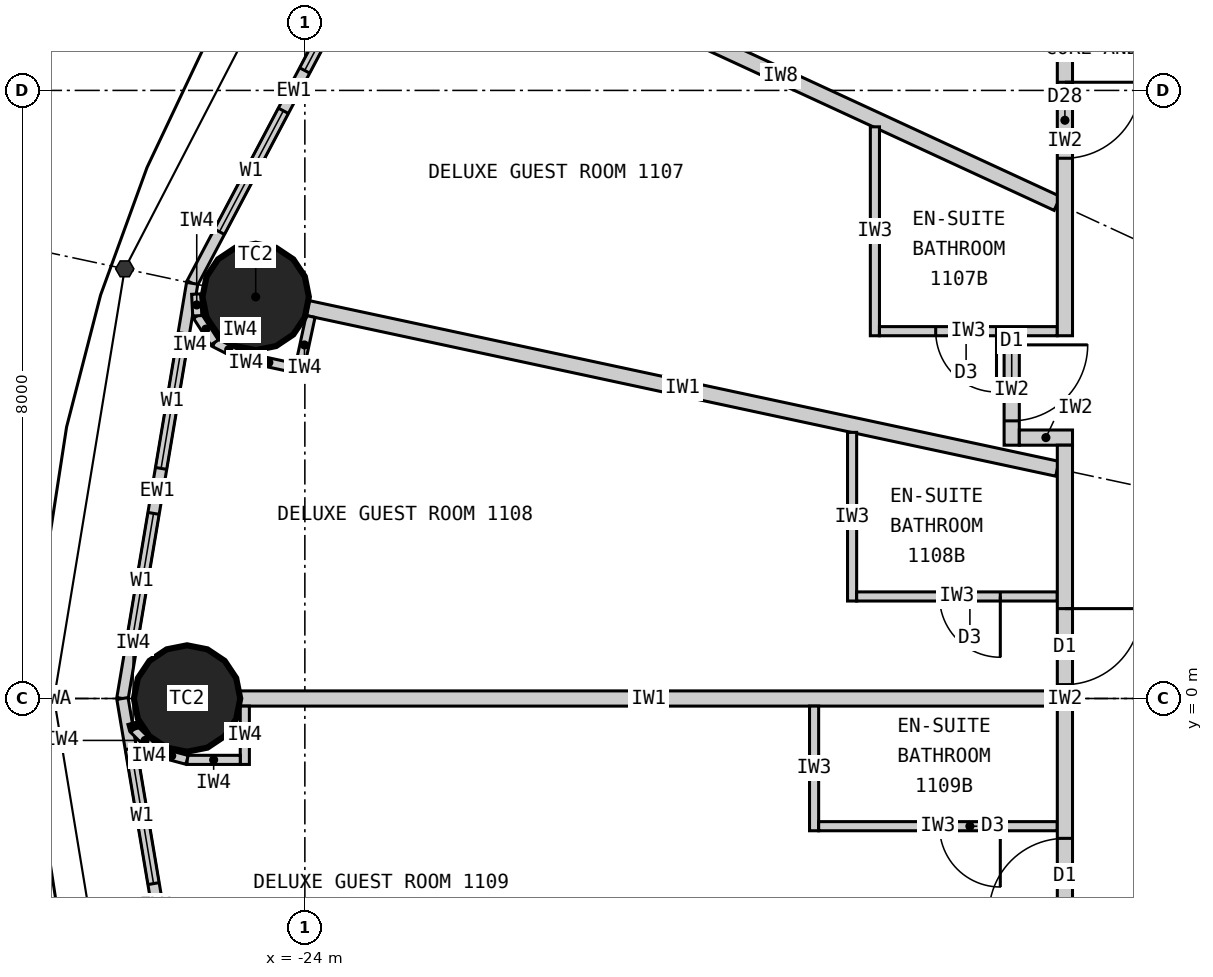
"""IFC4 building model, lengths in metres.
Left out: names, types, materials, properties, quantities, classifications, styles, units other than length and angle.
Written with IfcOpenShell. Run it as: python <this file> out.ifc"""

import sys

from ifc_helpers import new_model, si_unit, direction, frame, frame_2d, origin, origin_2d, place, context, subcontext, project, spatial, rectangle, circle, extrude, element, fill, save


model = new_model("IFC4")
c1 = context("Model", 3, precision=1e-05, world=origin(), true_north=direction((0.0, 1.0)))
c2 = subcontext(c1, "Body", "Model", "MODEL_VIEW")
j1 = project(units=[si_unit("LENGTHUNIT", "METRE"), si_unit("PLANEANGLEUNIT", "RADIAN")], contexts=[c1])
p1 = place(None, origin())
s1 = spatial("IfcSite", under=j1, at=p1, CompositionType="ELEMENT")
p2 = place(p1, origin())
s2 = spatial("IfcBuilding", under=s1, at=p2, CompositionType="ELEMENT")
p3 = place(p2, frame((0.0, 0.0, 50.7)))
s3 = spatial("IfcBuildingStorey", under=s2, at=p3, CompositionType="ELEMENT", Elevation=50.7)
for number, where, z_axis, x_axis in (
    (1, (-24.647, 5.283, 0.0), (0.0, 0.0, 1.0), (1.0, 0.0, 0.0)),
    (2, (-25.55, 0.0, 0.0), (0.0, 0.0, 1.0), (1.0, 0.0, 0.0)),
):
    element("IfcColumn", number, at=place(p3, frame(where, z_axis=z_axis, x_axis=x_axis)), inside=s3, PredefinedType="COLUMN", context=c2, shape_type="SweptSolid", body=[
        extrude(circle(Radius=0.7, at=origin_2d()), origin(), (0.0, 0.0, 1.0), 3.3),
    ])
p4 = place(p3, frame((-22.803, 10.532, 0.0), z_axis=(0.0, 0.0, 1.0), x_axis=(-0.467296867008, -0.884100468321, 0.0)))
e3 = element("IfcWall", 3, at=p4, inside=s3, PredefinedType="ELEMENTEDWALL", context=c2, shape_type="SweptSolid", body=[
    extrude(rectangle(XDim=5.734, YDim=0.15, at=frame_2d((2.867, 0.0))), origin(), (0.0, 0.0, 1.0), 3.12),
])
p5 = place(p4, frame((0.767, 0.0, 0.9)))
e4 = element("IfcOpeningElement", 4, at=p5, cuts=e3, PredefinedType="OPENING", context=c2, shape_type="SweptSolid", body=[
    extrude(rectangle(XDim=1.8, YDim=1.9, at=frame_2d((0.9, 0.95))), frame((0.0, 0.085, 0.0), z_axis=(0.0, -1.0, 0.0), x_axis=(1.0, 0.0, 0.0)), (0.0, 0.0, 1.0), 0.17),
])
p6 = place(p4, frame((3.167, 0.0, 0.9)))
e5 = element("IfcOpeningElement", 5, at=p6, cuts=e3, PredefinedType="OPENING", context=c2, shape_type="SweptSolid", body=[
    extrude(rectangle(XDim=1.8, YDim=1.9, at=frame_2d((0.9, 0.95))), frame((0.0, 0.085, 0.0), z_axis=(0.0, -1.0, 0.0), x_axis=(1.0, 0.0, 0.0)), (0.0, 0.0, 1.0), 0.17),
])
p7 = place(p3, frame((-25.482, 5.462, 0.0), z_axis=(0.0, 0.0, 1.0), x_axis=(-0.165642551694, -0.986185857264, 0.0)))
e6 = element("IfcWall", 6, at=p7, inside=s3, PredefinedType="ELEMENTEDWALL", context=c2, shape_type="SweptSolid", body=[
    extrude(rectangle(XDim=5.539, YDim=0.15, at=frame_2d((2.77, 0.0))), origin(), (0.0, 0.0, 1.0), 3.12),
])
p8 = place(p7, frame((0.669, 0.0, 0.9)))
e7 = element("IfcOpeningElement", 7, at=p8, cuts=e6, PredefinedType="OPENING", context=c2, shape_type="SweptSolid", body=[
    extrude(rectangle(XDim=1.8, YDim=1.9, at=frame_2d((0.9, 0.95))), frame((0.0, 0.085, 0.0), z_axis=(0.0, -1.0, 0.0), x_axis=(1.0, 0.0, 0.0)), (0.0, 0.0, 1.0), 0.17),
])
p9 = place(p7, frame((3.07, 0.0, 0.9)))
e8 = element("IfcOpeningElement", 8, at=p9, cuts=e6, PredefinedType="OPENING", context=c2, shape_type="SweptSolid", body=[
    extrude(rectangle(XDim=1.8, YDim=1.9, at=frame_2d((0.9, 0.95))), frame((0.0, 0.085, 0.0), z_axis=(0.0, -1.0, 0.0), x_axis=(1.0, 0.0, 0.0)), (0.0, 0.0, 1.0), 0.17),
])
p10 = place(p3, frame((-26.4, 0.0, 0.0), z_axis=(0.0, 0.0, 1.0), x_axis=(0.165642551694, -0.986185857264, 0.0)))
e9 = element("IfcWall", 9, at=p10, inside=s3, PredefinedType="ELEMENTEDWALL", context=c2, shape_type="SweptSolid", body=[
    extrude(rectangle(XDim=5.539, YDim=0.15, at=frame_2d((2.77, 0.0))), origin(), (0.0, 0.0, 1.0), 3.12),
])
p11 = place(p10, frame((0.669, 0.0, 0.9)))
e10 = element("IfcOpeningElement", 10, at=p11, cuts=e9, PredefinedType="OPENING", context=c2, shape_type="SweptSolid", body=[
    extrude(rectangle(XDim=1.8, YDim=1.9, at=frame_2d((0.9, 0.95))), frame((0.0, 0.085, 0.0), z_axis=(0.0, -1.0, 0.0), x_axis=(1.0, 0.0, 0.0)), (0.0, 0.0, 1.0), 0.17),
])
p12 = place(p10, frame((3.07, 0.0, 0.9)))
e11 = element("IfcOpeningElement", 11, at=p12, cuts=e9, PredefinedType="OPENING", context=c2, shape_type="SweptSolid", body=[
    extrude(rectangle(XDim=1.8, YDim=1.9, at=frame_2d((0.9, 0.95))), frame((0.0, 0.085, 0.0), z_axis=(0.0, -1.0, 0.0), x_axis=(1.0, 0.0, 0.0)), (0.0, 0.0, 1.0), 0.17),
])
p13 = place(p3, frame((-14.1, 6.512, 0.0), z_axis=(0.0, 0.0, 1.0), x_axis=(-0.907832871056, 0.419332181247, 0.0)))
e12 = element("IfcWall", 12, at=p13, inside=s3, PredefinedType="PARTITIONING", context=c2, shape_type="SweptSolid", body=[
    extrude(rectangle(XDim=8.023, YDim=0.2, at=frame_2d((4.011, 0.0))), origin(), (0.0, 0.0, 1.0), 2.32),
])
p14 = place(p3, frame((-14.1, 3.022, 0.0), z_axis=(0.0, 0.0, 1.0), x_axis=(-0.977790014929, 0.209586943072, 0.0)))
e13 = element("IfcWall", 13, at=p14, inside=s3, PredefinedType="PARTITIONING", context=c2, shape_type="SweptSolid", body=[
    extrude(rectangle(XDim=10.087, YDim=0.2, at=frame_2d((5.043, 0.0))), origin(), (0.0, 0.0, 1.0), 2.32),
])
p15 = place(p3, frame((-14.1, 0.0, 0.0), z_axis=(0.0, 0.0, 1.0), x_axis=(-1.0, 0.0, 0.0)))
e14 = element("IfcWall", 14, at=p15, inside=s3, PredefinedType="PARTITIONING", context=c2, shape_type="SweptSolid", body=[
    extrude(rectangle(XDim=10.75, YDim=0.2, at=frame_2d((5.375, 0.0))), origin(), (0.0, 0.0, 1.0), 2.27),
])
p16 = place(p3, frame((-16.5, 7.521, 0.0), z_axis=(0.0, 0.0, 1.0), x_axis=(0.0, -1.0, 0.0)))
e15 = element("IfcWall", 15, at=p16, inside=s3, PredefinedType="PARTITIONING", context=c2, shape_type="SweptSolid", body=[
    extrude(rectangle(XDim=2.749, YDim=0.12, at=frame_2d((1.374, 0.0))), origin(), (0.0, 0.0, 1.0), 3.12),
])
p17 = place(p3, frame((-14.1, 4.833, 0.0), z_axis=(0.0, 0.0, 1.0), x_axis=(-1.0, 0.0, 0.0)))
e16 = element("IfcWall", 16, at=p17, inside=s3, PredefinedType="PARTITIONING", context=c2, shape_type="SweptSolid", body=[
    extrude(rectangle(XDim=2.34, YDim=0.12, at=frame_2d((1.17, 0.0))), origin(), (0.0, 0.0, 1.0), 3.12),
])
p18 = place(p17, frame((0.8, 0.0, 0.0)))
e17 = element("IfcOpeningElement", 17, at=p18, cuts=e16, PredefinedType="OPENING", context=c2, shape_type="SweptSolid", body=[
    extrude(rectangle(XDim=0.8, YDim=2.1, at=frame_2d((0.4, 1.05))), frame((0.0, 0.07, 0.0), z_axis=(0.0, -1.0, 0.0), x_axis=(1.0, 0.0, 0.0)), (0.0, 0.0, 1.0), 0.14),
])
p19 = place(p3, frame((-16.8, 3.501, 0.0), z_axis=(0.0, 0.0, 1.0), x_axis=(0.0, -1.0, 0.0)))
e18 = element("IfcWall", 18, at=p19, inside=s3, PredefinedType="PARTITIONING", context=c2, shape_type="SweptSolid", body=[
    extrude(rectangle(XDim=2.219, YDim=0.12, at=frame_2d((1.109, 0.0))), origin(), (0.0, 0.0, 1.0), 3.12),
])
p20 = place(p3, frame((-14.1, 1.343, 0.0), z_axis=(0.0, 0.0, 1.0), x_axis=(-1.0, 0.0, 0.0)))
e19 = element("IfcWall", 19, at=p20, inside=s3, PredefinedType="PARTITIONING", context=c2, shape_type="SweptSolid", body=[
    extrude(rectangle(XDim=2.64, YDim=0.12, at=frame_2d((1.32, 0.0))), origin(), (0.0, 0.0, 1.0), 3.12),
])
p21 = place(p20, frame((0.75, 0.0, 0.0)))
e20 = element("IfcOpeningElement", 20, at=p21, cuts=e19, PredefinedType="OPENING", context=c2, shape_type="SweptSolid", body=[
    extrude(rectangle(XDim=0.8, YDim=2.1, at=frame_2d((0.4, 1.05))), frame((0.0, 0.07, 0.0), z_axis=(0.0, -1.0, 0.0), x_axis=(1.0, 0.0, 0.0)), (0.0, 0.0, 1.0), 0.14),
])
p22 = place(p3, frame((-17.3, -0.1, 0.0), z_axis=(0.0, 0.0, 1.0), x_axis=(0.0, -1.0, 0.0)))
e21 = element("IfcWall", 21, at=p22, inside=s3, PredefinedType="PARTITIONING", context=c2, shape_type="SweptSolid", body=[
    extrude(rectangle(XDim=1.64, YDim=0.12, at=frame_2d((0.82, 0.0))), origin(), (0.0, 0.0, 1.0), 3.12),
])
p23 = place(p3, frame((-14.1, -1.68, 0.0), z_axis=(0.0, 0.0, 1.0), x_axis=(-1.0, 0.0, 0.0)))
e22 = element("IfcWall", 22, at=p23, inside=s3, PredefinedType="PARTITIONING", context=c2, shape_type="SweptSolid", body=[
    extrude(rectangle(XDim=3.14, YDim=0.12, at=frame_2d((1.57, 0.0))), origin(), (0.0, 0.0, 1.0), 3.12),
])
p24 = place(p23, frame((0.75, 0.0, 0.0)))
e23 = element("IfcOpeningElement", 23, at=p24, cuts=e22, PredefinedType="OPENING", context=c2, shape_type="SweptSolid", body=[
    extrude(rectangle(XDim=0.8, YDim=2.1, at=frame_2d((0.4, 1.05))), frame((0.0, 0.07, 0.0), z_axis=(0.0, -1.0, 0.0), x_axis=(1.0, 0.0, 0.0)), (0.0, 0.0, 1.0), 0.14),
])
p25 = place(p3, frame((-14.7, 4.772, 0.0), z_axis=(0.0, 0.0, 1.0), x_axis=(0.0, -1.0, 0.0)))
e24 = element("IfcWall", 24, at=p25, inside=s3, PredefinedType="PARTITIONING", context=c2, shape_type="SweptSolid", body=[
    extrude(rectangle(XDim=1.44, YDim=0.2, at=frame_2d((0.72, 0.0))), origin(), (0.0, 0.0, 1.0), 3.12),
])
p26 = place(p25, frame((0.12, 0.0, 0.0)))
e25 = element("IfcOpeningElement", 25, at=p26, cuts=e24, PredefinedType="OPENING", context=c2, shape_type="SweptSolid", body=[
    extrude(rectangle(XDim=1.0, YDim=2.2, at=frame_2d((0.5, 1.1))), frame((0.0, 0.11, 0.0), z_axis=(0.0, -1.0, 0.0), x_axis=(1.0, 0.0, 0.0)), (0.0, 0.0, 1.0), 0.22),
])
p27 = place(p3, frame((-13.9, 3.433, 0.0), z_axis=(0.0, 0.0, 1.0), x_axis=(-1.0, 0.0, 0.0)))
e26 = element("IfcWall", 26, at=p27, inside=s3, PredefinedType="PARTITIONING", context=c2, shape_type="SweptSolid", body=[
    extrude(rectangle(XDim=0.7, YDim=0.2, at=frame_2d((0.35, 0.0))), origin(), (0.0, 0.0, 1.0), 2.32),
])
p28 = place(p3, frame((-14.0, 9.9, 0.0), z_axis=(0.0, 0.0, 1.0), x_axis=(0.0, -1.0, 0.0)))
e27 = element("IfcWall", 27, at=p28, inside=s3, PredefinedType="PARTITIONING", context=c2, shape_type="SweptSolid", body=[
    extrude(rectangle(XDim=5.127, YDim=0.2, at=frame_2d((2.564, 0.0))), origin(), (0.0, 0.0, 1.0), 3.12),
])
p29 = place(p28, frame((1.792, 0.0, 0.0)))
e28 = element("IfcOpeningElement", 28, at=p29, cuts=e27, PredefinedType="OPENING", context=c2, shape_type="SweptSolid", body=[
    extrude(rectangle(XDim=1.0, YDim=2.2, at=frame_2d((0.5, 1.1))), frame((0.0, 0.11, 0.0), z_axis=(0.0, -1.0, 0.0), x_axis=(1.0, 0.0, 0.0)), (0.0, 0.0, 1.0), 0.22),
])
p30 = place(p3, frame((-14.0, 3.333, 0.0), z_axis=(0.0, 0.0, 1.0), x_axis=(0.0, -1.0, 0.0)))
e29 = element("IfcWall", 29, at=p30, inside=s3, PredefinedType="PARTITIONING", context=c2, shape_type="SweptSolid", body=[
    extrude(rectangle(XDim=6.665, YDim=0.2, at=frame_2d((3.333, 0.0))), origin(), (0.0, 0.0, 1.0), 3.12),
])
p31 = place(p30, frame((2.15, 0.0, 0.0)))
e30 = element("IfcOpeningElement", 30, at=p31, cuts=e29, PredefinedType="OPENING", context=c2, shape_type="SweptSolid", body=[
    extrude(rectangle(XDim=1.0, YDim=2.2, at=frame_2d((0.5, 1.1))), frame((0.0, 0.11, 0.0), z_axis=(0.0, -1.0, 0.0), x_axis=(1.0, 0.0, 0.0)), (0.0, 0.0, 1.0), 0.22),
])
p32 = place(p30, frame((5.173, 0.0, 0.0)))
e31 = element("IfcOpeningElement", 31, at=p32, cuts=e29, PredefinedType="OPENING", context=c2, shape_type="SweptSolid", body=[
    extrude(rectangle(XDim=1.0, YDim=2.2, at=frame_2d((0.5, 1.1))), frame((0.0, 0.11, 0.0), z_axis=(0.0, -1.0, 0.0), x_axis=(1.0, 0.0, 0.0)), (0.0, 0.0, 1.0), 0.22),
])
p33 = place(p3, frame((-23.925, 5.026, 0.0), z_axis=(0.0, 0.0, 1.0), x_axis=(-0.209681192172, -0.977769808109, 0.0)))
e32 = element("IfcWall", 32, at=p33, inside=s3, PredefinedType="PARTITIONING", context=c2, shape_type="SweptSolid", body=[
    extrude(rectangle(XDim=0.767, YDim=0.12, at=frame_2d((0.384, 0.0))), origin(), (0.0, 0.0, 1.0), 3.12),
])
p34 = place(p3, frame((-24.132, 4.347, 0.0), z_axis=(0.0, 0.0, 1.0), x_axis=(-0.977776882509, 0.209648200638, 0.0)))
e33 = element("IfcWall", 33, at=p34, inside=s3, PredefinedType="PARTITIONING", context=c2, shape_type="SweptSolid", body=[
    extrude(rectangle(XDim=0.7, YDim=0.12, at=frame_2d((0.35, 0.0))), origin(), (0.0, 0.0, 1.0), 3.12),
])
for number, where, z_axis, x_axis in (
    (34, (-24.816, 4.494, 0.0), (0.0, 0.0, 1.0), (-0.89, 0.455, 0.0)),
    (35, (-25.188, 4.684, 0.0), (0.0, 0.0, 1.0), (-0.543, 0.84, 0.0)),
):
    element("IfcWall", number, at=place(p3, frame(where, z_axis=z_axis, x_axis=x_axis)), inside=s3, PredefinedType="PARTITIONING", context=c2, shape_type="SweptSolid", body=[
        extrude(rectangle(XDim=0.418, YDim=0.12, at=frame_2d((0.209, 0.0))), origin(), (0.0, 0.0, 1.0), 3.12),
    ])
p35 = place(p3, frame((-25.416, 5.035, 0.0), z_axis=(0.0, 0.0, 1.0), x_axis=(-0.050406329159, 0.998728793007, 0.0)))
e36 = element("IfcWall", 36, at=p35, inside=s3, PredefinedType="PARTITIONING", context=c2, shape_type="SweptSolid", body=[
    extrude(rectangle(XDim=0.286, YDim=0.12, at=frame_2d((0.143, 0.0))), origin(), (0.0, 0.0, 1.0), 3.12),
])
p36 = place(p3, frame((-24.79, -0.1, 0.0), z_axis=(0.0, 0.0, 1.0), x_axis=(0.0, -1.0, 0.0)))
e37 = element("IfcWall", 37, at=p36, inside=s3, PredefinedType="PARTITIONING", context=c2, shape_type="SweptSolid", body=[
    extrude(rectangle(XDim=0.767, YDim=0.12, at=frame_2d((0.384, 0.0))), origin(), (0.0, 0.0, 1.0), 3.12),
])
p37 = place(p3, frame((-24.85, -0.808, 0.0), z_axis=(0.0, 0.0, 1.0), x_axis=(-1.0, 0.0, 0.0)))
e38 = element("IfcWall", 38, at=p37, inside=s3, PredefinedType="PARTITIONING", context=c2, shape_type="SweptSolid", body=[
    extrude(rectangle(XDim=0.7, YDim=0.12, at=frame_2d((0.35, 0.0))), origin(), (0.0, 0.0, 1.0), 3.12),
])
p38 = place(p3, frame((-25.55, -0.808, 0.0), z_axis=(0.0, 0.0, 1.0), x_axis=(-0.965807183573, 0.2592614205, 0.0)))
e39 = element("IfcWall", 39, at=p38, inside=s3, PredefinedType="PARTITIONING", context=c2, shape_type="SweptSolid", body=[
    extrude(rectangle(XDim=0.418, YDim=0.12, at=frame_2d((0.209, 0.0))), origin(), (0.0, 0.0, 1.0), 3.12),
])
p39 = place(p3, frame((-25.954, -0.699, 0.0), z_axis=(0.0, 0.0, 1.0), x_axis=(-0.707106781187, 0.707106781187, 0.0)))
e40 = element("IfcWall", 40, at=p39, inside=s3, PredefinedType="PARTITIONING", context=c2, shape_type="SweptSolid", body=[
    extrude(rectangle(XDim=0.418, YDim=0.12, at=frame_2d((0.209, 0.0))), origin(), (0.0, 0.0, 1.0), 3.12),
])
p40 = place(p3, frame((-26.249, -0.404, 0.0), z_axis=(0.0, 0.0, 1.0), x_axis=(-0.259754282609, 0.965674744759, 0.0)))
e41 = element("IfcWall", 41, at=p40, inside=s3, PredefinedType="PARTITIONING", context=c2, shape_type="SweptSolid", body=[
    extrude(rectangle(XDim=0.08, YDim=0.12, at=frame_2d((0.04, 0.0))), origin(), (0.0, 0.0, 1.0), 3.12),
])
p41 = place(p5, origin())
e42 = element("IfcWindow", 42, at=p41, inside=s3, PartitioningType="SINGLE_PANEL", PredefinedType="WINDOW", context=c2, shape_type="SweptSolid", body=[
    extrude(rectangle(XDim=1.8, YDim=1.9, at=frame_2d((0.9, 0.95))), frame((0.0, 0.03, 0.0), z_axis=(0.0, -1.0, 0.0), x_axis=(1.0, 0.0, 0.0)), (0.0, 0.0, 1.0), 0.06),
])
fill(e4, e42)
p42 = place(p6, origin())
e43 = element("IfcWindow", 43, at=p42, inside=s3, PartitioningType="SINGLE_PANEL", PredefinedType="WINDOW", context=c2, shape_type="SweptSolid", body=[
    extrude(rectangle(XDim=1.8, YDim=1.9, at=frame_2d((0.9, 0.95))), frame((0.0, 0.03, 0.0), z_axis=(0.0, -1.0, 0.0), x_axis=(1.0, 0.0, 0.0)), (0.0, 0.0, 1.0), 0.06),
])
fill(e5, e43)
p43 = place(p8, origin())
e44 = element("IfcWindow", 44, at=p43, inside=s3, PartitioningType="SINGLE_PANEL", PredefinedType="WINDOW", context=c2, shape_type="SweptSolid", body=[
    extrude(rectangle(XDim=1.8, YDim=1.9, at=frame_2d((0.9, 0.95))), frame((0.0, 0.03, 0.0), z_axis=(0.0, -1.0, 0.0), x_axis=(1.0, 0.0, 0.0)), (0.0, 0.0, 1.0), 0.06),
])
fill(e7, e44)
p44 = place(p9, origin())
e45 = element("IfcWindow", 45, at=p44, inside=s3, PartitioningType="SINGLE_PANEL", PredefinedType="WINDOW", context=c2, shape_type="SweptSolid", body=[
    extrude(rectangle(XDim=1.8, YDim=1.9, at=frame_2d((0.9, 0.95))), frame((0.0, 0.03, 0.0), z_axis=(0.0, -1.0, 0.0), x_axis=(1.0, 0.0, 0.0)), (0.0, 0.0, 1.0), 0.06),
])
fill(e8, e45)
p45 = place(p11, origin())
e46 = element("IfcWindow", 46, at=p45, inside=s3, PartitioningType="SINGLE_PANEL", PredefinedType="WINDOW", context=c2, shape_type="SweptSolid", body=[
    extrude(rectangle(XDim=1.8, YDim=1.9, at=frame_2d((0.9, 0.95))), frame((0.0, 0.03, 0.0), z_axis=(0.0, -1.0, 0.0), x_axis=(1.0, 0.0, 0.0)), (0.0, 0.0, 1.0), 0.06),
])
fill(e10, e46)
p46 = place(p29, origin())
e47 = element("IfcDoor", 47, at=p46, inside=s3, OperationType="SINGLE_SWING_LEFT", PredefinedType="DOOR", context=c2, shape_type="SweptSolid", body=[
    extrude(rectangle(XDim=1.0, YDim=2.2, at=frame_2d((0.5, 1.1))), frame((0.0, 0.025, 0.0), z_axis=(0.0, -1.0, 0.0), x_axis=(1.0, 0.0, 0.0)), (0.0, 0.0, 1.0), 0.05),
])
fill(e28, e47)
p47 = place(p18, origin())
e48 = element("IfcDoor", 48, at=p47, inside=s3, OperationType="SINGLE_SWING_LEFT", PredefinedType="DOOR", context=c2, shape_type="SweptSolid", body=[
    extrude(rectangle(XDim=0.8, YDim=2.1, at=frame_2d((0.4, 1.05))), frame((0.0, 0.025, 0.0), z_axis=(0.0, -1.0, 0.0), x_axis=(1.0, 0.0, 0.0)), (0.0, 0.0, 1.0), 0.05),
])
fill(e17, e48)
p48 = place(p26, origin())
e49 = element("IfcDoor", 49, at=p48, inside=s3, OperationType="SINGLE_SWING_LEFT", PredefinedType="DOOR", context=c2, shape_type="SweptSolid", body=[
    extrude(rectangle(XDim=1.0, YDim=2.2, at=frame_2d((0.5, 1.1))), frame((0.0, 0.025, 0.0), z_axis=(0.0, -1.0, 0.0), x_axis=(1.0, 0.0, 0.0)), (0.0, 0.0, 1.0), 0.05),
])
fill(e25, e49)
p49 = place(p21, origin())
e50 = element("IfcDoor", 50, at=p49, inside=s3, OperationType="SINGLE_SWING_LEFT", PredefinedType="DOOR", context=c2, shape_type="SweptSolid", body=[
    extrude(rectangle(XDim=0.8, YDim=2.1, at=frame_2d((0.4, 1.05))), frame((0.0, 0.025, 0.0), z_axis=(0.0, -1.0, 0.0), x_axis=(1.0, 0.0, 0.0)), (0.0, 0.0, 1.0), 0.05),
])
fill(e20, e50)
p50 = place(p31, origin())
e51 = element("IfcDoor", 51, at=p50, inside=s3, OperationType="SINGLE_SWING_LEFT", PredefinedType="DOOR", context=c2, shape_type="SweptSolid", body=[
    extrude(rectangle(XDim=1.0, YDim=2.2, at=frame_2d((0.5, 1.1))), frame((0.0, 0.025, 0.0), z_axis=(0.0, -1.0, 0.0), x_axis=(1.0, 0.0, 0.0)), (0.0, 0.0, 1.0), 0.05),
])
fill(e30, e51)
p51 = place(p24, origin())
e52 = element("IfcDoor", 52, at=p51, inside=s3, OperationType="SINGLE_SWING_LEFT", PredefinedType="DOOR", context=c2, shape_type="SweptSolid", body=[
    extrude(rectangle(XDim=0.8, YDim=2.1, at=frame_2d((0.4, 1.05))), frame((0.0, 0.025, 0.0), z_axis=(0.0, -1.0, 0.0), x_axis=(1.0, 0.0, 0.0)), (0.0, 0.0, 1.0), 0.05),
])
fill(e23, e52)
p52 = place(p32, origin())
e53 = element("IfcDoor", 53, at=p52, inside=s3, OperationType="SINGLE_SWING_RIGHT", PredefinedType="DOOR", context=c2, shape_type="SweptSolid", body=[
    extrude(rectangle(XDim=1.0, YDim=2.2, at=frame_2d((0.5, 1.1))), frame((0.0, 0.025, 0.0), z_axis=(0.0, -1.0, 0.0), x_axis=(1.0, 0.0, 0.0)), (0.0, 0.0, 1.0), 0.05),
])
fill(e31, e53)
save(model, sys.argv[1])
